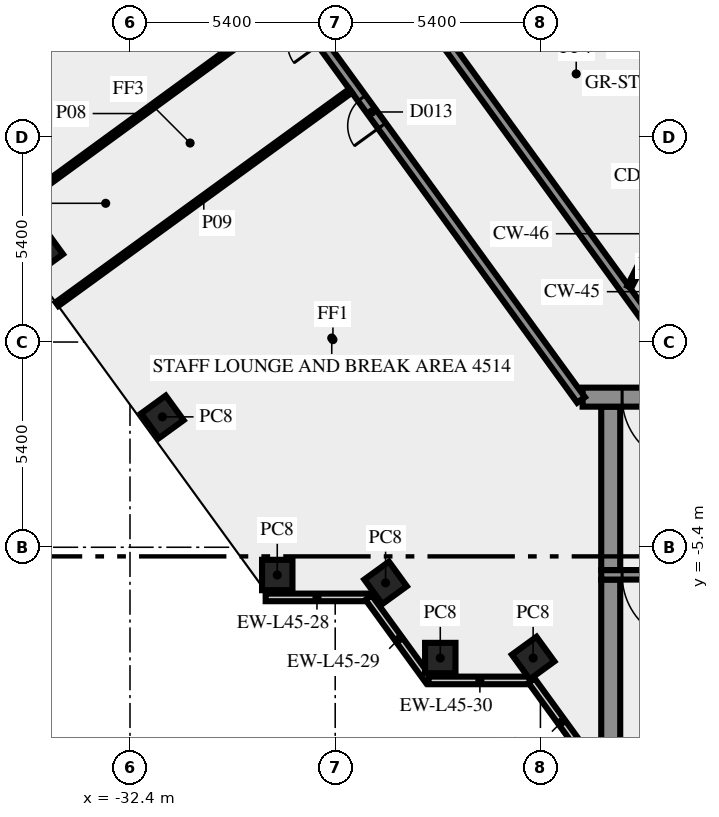
"""IFC4 building model, lengths in metres.
Left out: names, types, materials, properties, quantities, classifications, styles, units other than length and angle.
Written with IfcOpenShell. Run it as: python <this file> out.ifc"""

import sys

from ifc_helpers import new_model, si_unit, direction, frame, frame_2d, origin, origin_2d, place, context, subcontext, project, spatial, rectangle, extrude, element, fill, save


model = new_model("IFC4")
c1 = context("Model", 3, precision=1e-05, world=origin(), true_north=direction((0.0, 1.0)))
c2 = subcontext(c1, "Body", "Model", "MODEL_VIEW")
j1 = project(units=[si_unit("LENGTHUNIT", "METRE"), si_unit("PLANEANGLEUNIT", "RADIAN")], contexts=[c1])
p1 = place(None, origin())
s1 = spatial("IfcSite", under=j1, at=p1, CompositionType="ELEMENT")
p2 = place(p1, origin())
s2 = spatial("IfcBuilding", under=s1, at=p2, CompositionType="ELEMENT")
p3 = place(p2, frame((0.0, 0.0, 194.0)))
s3 = spatial("IfcBuildingStorey", under=s2, at=p3, CompositionType="ELEMENT", Elevation=194.0)
for number, where, z_axis, x_axis in (
    (1, (-34.722, 2.4, 0.0), (0.0, 0.0, 1.0), (0.588, -0.809, 0.0)),
    (2, (-31.548, -1.969, 0.0), (0.0, 0.0, 1.0), (0.588, -0.809, 0.0)),
    (3, (-28.525, -6.13, 0.0), (0.0, 0.0, 1.0), (1.0, 0.0, 0.0)),
    (4, (-25.674, -6.337, 0.0), (0.0, 0.0, 1.0), (0.588, -0.809, 0.0)),
    (5, (-24.235, -8.315, 0.0), (0.0, 0.0, 1.0), (1.0, 0.0, 0.0)),
    (6, (-21.792, -8.315, 0.0), (0.0, 0.0, 1.0), (0.588, -0.809, 0.0)),
):
    element("IfcColumn", number, at=place(p3, frame(where, z_axis=z_axis, x_axis=x_axis)), inside=s3, PredefinedType="COLUMN", context=c2, shape_type="SweptSolid", body=[
        extrude(rectangle(XDim=0.8, YDim=0.8, at=origin_2d()), origin(), (0.0, 0.0, 1.0), 3.65),
    ])
p4 = place(p3, frame((-28.83, -6.719, 0.0), z_axis=(0.0, 0.0, 1.0), x_axis=(1.0, 0.0, 0.0)))
e7 = element("IfcWall", 7, at=p4, inside=s3, PredefinedType="SOLIDWALL", context=c2, shape_type="SweptSolid", body=[
    extrude(rectangle(XDim=2.7, YDim=0.2, at=frame_2d((1.35, 0.0))), origin(), (0.0, 0.0, 1.0), 3.65),
])
p5 = place(p3, frame((-26.12, -6.724, 0.0), z_axis=(0.0, 0.0, 1.0), x_axis=(0.587720002413, -0.809064397168, 0.0)))
e8 = element("IfcWall", 8, at=p5, inside=s3, PredefinedType="SOLIDWALL", context=c2, shape_type="SweptSolid", body=[
    extrude(rectangle(XDim=2.7, YDim=0.2, at=frame_2d((1.35, 0.0))), origin(), (0.0, 0.0, 1.0), 3.65),
])
p6 = place(p3, frame((-24.543, -8.904, 0.0), z_axis=(0.0, 0.0, 1.0), x_axis=(1.0, 0.0, 0.0)))
e9 = element("IfcWall", 9, at=p6, inside=s3, PredefinedType="SOLIDWALL", context=c2, shape_type="SweptSolid", body=[
    extrude(rectangle(XDim=2.7, YDim=0.2, at=frame_2d((1.35, 0.0))), origin(), (0.0, 0.0, 1.0), 3.65),
])
p7 = place(p3, frame((-21.833, -8.909, 0.0), z_axis=(0.0, 0.0, 1.0), x_axis=(0.587766567315, -0.809030569476, 0.0)))
e10 = element("IfcWall", 10, at=p7, inside=s3, PredefinedType="SOLIDWALL", context=c2, shape_type="SweptSolid", body=[
    extrude(rectangle(XDim=2.688, YDim=0.2, at=frame_2d((1.344, 0.0))), origin(), (0.0, 0.0, 1.0), 3.65),
])
p8 = place(p3, frame((-19.75, -10.5, 0.0), z_axis=(0.0, 0.0, 1.0), x_axis=(0.0, 1.0, 0.0)))
e11 = element("IfcWall", 11, at=p8, inside=s3, PredefinedType="SHEAR", context=c2, shape_type="SweptSolid", body=[
    extrude(rectangle(XDim=4.25, YDim=0.5, at=frame_2d((2.125, 0.0))), origin(), (0.0, 0.0, 1.0), 3.65),
])
p9 = place(p3, frame((-9.2, -6.125, 0.0), z_axis=(0.0, 0.0, 1.0), x_axis=(-1.0, 0.0, 0.0)))
e12 = element("IfcWall", 12, at=p9, inside=s3, PredefinedType="SHEAR", context=c2, shape_type="SweptSolid", body=[
    extrude(rectangle(XDim=10.8, YDim=0.25, at=frame_2d((5.4, 0.0))), origin(), (0.0, 0.0, 1.0), 3.65),
])
p10 = place(p9, frame((8.45, 0.0, 0.0)))
e13 = element("IfcOpeningElement", 13, at=p10, cuts=e12, PredefinedType="OPENING", context=c2, shape_type="SweptSolid", body=[
    extrude(rectangle(XDim=1.8, YDim=2.1, at=frame_2d((0.9, 1.05))), frame((0.0, 0.135, 0.0), z_axis=(0.0, -1.0, 0.0), x_axis=(1.0, 0.0, 0.0)), (0.0, 0.0, 1.0), 0.27),
])
p11 = place(p3, frame((-19.75, -6.0, 0.0), z_axis=(0.0, 0.0, 1.0), x_axis=(0.0, 1.0, 0.0)))
e14 = element("IfcWall", 14, at=p11, inside=s3, PredefinedType="SHEAR", context=c2, shape_type="SweptSolid", body=[
    extrude(rectangle(XDim=4.3, YDim=0.5, at=frame_2d((2.15, 0.0))), origin(), (0.0, 0.0, 1.0), 3.65),
])
p12 = place(p3, frame((20.49, -1.45, 0.0), z_axis=(0.0, 0.0, 1.0), x_axis=(-1.0, 0.0, 0.0)))
e15 = element("IfcWall", 15, at=p12, inside=s3, PredefinedType="SHEAR", context=c2, shape_type="SweptSolid", body=[
    extrude(rectangle(XDim=40.98, YDim=0.5, at=frame_2d((20.49, 0.0))), origin(), (0.0, 0.0, 1.0), 3.65),
])
p13 = place(p12, frame((38.14, 0.0, 0.0)))
e16 = element("IfcOpeningElement", 16, at=p13, cuts=e15, PredefinedType="OPENING", context=c2, shape_type="SweptSolid", body=[
    extrude(rectangle(XDim=1.8, YDim=2.1, at=frame_2d((0.9, 1.05))), frame((0.0, 0.26, 0.0), z_axis=(0.0, -1.0, 0.0), x_axis=(1.0, 0.0, 0.0)), (0.0, 0.0, 1.0), 0.52),
])
p14 = place(p12, frame((35.89, 0.0, 0.0)))
e17 = element("IfcOpeningElement", 17, at=p14, cuts=e15, PredefinedType="OPENING", context=c2, shape_type="SweptSolid", body=[
    extrude(rectangle(XDim=0.9, YDim=2.1, at=frame_2d((0.45, 1.05))), frame((0.0, 0.26, 0.0), z_axis=(0.0, -1.0, 0.0), x_axis=(1.0, 0.0, 0.0)), (0.0, 0.0, 1.0), 0.52),
])
p15 = place(p12, frame((32.94, 0.0, 0.0)))
e18 = element("IfcOpeningElement", 18, at=p15, cuts=e15, PredefinedType="OPENING", context=c2, shape_type="SweptSolid", body=[
    extrude(rectangle(XDim=0.9, YDim=2.1, at=frame_2d((0.45, 1.05))), frame((0.0, 0.26, 0.0), z_axis=(0.0, -1.0, 0.0), x_axis=(1.0, 0.0, 0.0)), (0.0, 0.0, 1.0), 0.52),
])
p16 = place(p12, frame((30.302, 0.0, 0.0)))
e19 = element("IfcOpeningElement", 19, at=p16, cuts=e15, PredefinedType="OPENING", context=c2, shape_type="SweptSolid", body=[
    extrude(rectangle(XDim=0.9, YDim=2.1, at=frame_2d((0.45, 1.05))), frame((0.0, 0.26, 0.0), z_axis=(0.0, -1.0, 0.0), x_axis=(1.0, 0.0, 0.0)), (0.0, 0.0, 1.0), 0.52),
])
p17 = place(p12, frame((26.577, 0.0, 0.0)))
e20 = element("IfcOpeningElement", 20, at=p17, cuts=e15, PredefinedType="OPENING", context=c2, shape_type="SweptSolid", body=[
    extrude(rectangle(XDim=0.9, YDim=2.1, at=frame_2d((0.45, 1.05))), frame((0.0, 0.26, 0.0), z_axis=(0.0, -1.0, 0.0), x_axis=(1.0, 0.0, 0.0)), (0.0, 0.0, 1.0), 0.52),
])
p18 = place(p12, frame((19.59, 0.0, 0.0)))
e21 = element("IfcOpeningElement", 21, at=p18, cuts=e15, PredefinedType="OPENING", context=c2, shape_type="SweptSolid", body=[
    extrude(rectangle(XDim=2.0, YDim=2.1, at=frame_2d((1.0, 1.05))), frame((0.0, 0.26, 0.0), z_axis=(0.0, -1.0, 0.0), x_axis=(1.0, 0.0, 0.0)), (0.0, 0.0, 1.0), 0.52),
])
p19 = place(p12, frame((7.14, 0.0, 0.0)))
e22 = element("IfcOpeningElement", 22, at=p19, cuts=e15, PredefinedType="OPENING", context=c2, shape_type="SweptSolid", body=[
    extrude(rectangle(XDim=0.9, YDim=2.1, at=frame_2d((0.45, 1.05))), frame((0.0, 0.26, 0.0), z_axis=(0.0, -1.0, 0.0), x_axis=(1.0, 0.0, 0.0)), (0.0, 0.0, 1.0), 0.52),
])
p20 = place(p12, frame((5.028, 0.0, 0.0)))
e23 = element("IfcOpeningElement", 23, at=p20, cuts=e15, PredefinedType="OPENING", context=c2, shape_type="SweptSolid", body=[
    extrude(rectangle(XDim=0.8, YDim=2.1, at=frame_2d((0.4, 1.05))), frame((0.0, 0.26, 0.0), z_axis=(0.0, -1.0, 0.0), x_axis=(1.0, 0.0, 0.0)), (0.0, 0.0, 1.0), 0.52),
])
p21 = place(p12, frame((3.452, 0.0, 0.0)))
e24 = element("IfcOpeningElement", 24, at=p21, cuts=e15, PredefinedType="OPENING", context=c2, shape_type="SweptSolid", body=[
    extrude(rectangle(XDim=0.8, YDim=2.1, at=frame_2d((0.4, 1.05))), frame((0.0, 0.26, 0.0), z_axis=(0.0, -1.0, 0.0), x_axis=(1.0, 0.0, 0.0)), (0.0, 0.0, 1.0), 0.52),
])
p22 = place(p12, frame((1.04, 0.0, 0.0)))
e25 = element("IfcOpeningElement", 25, at=p22, cuts=e15, PredefinedType="OPENING", context=c2, shape_type="SweptSolid", body=[
    extrude(rectangle(XDim=1.8, YDim=2.1, at=frame_2d((0.9, 1.05))), frame((0.0, 0.26, 0.0), z_axis=(0.0, -1.0, 0.0), x_axis=(1.0, 0.0, 0.0)), (0.0, 0.0, 1.0), 0.52),
])
p23 = place(p3, frame((-20.531, -1.523, 0.0), z_axis=(0.0, 0.0, 1.0), x_axis=(-0.587785812891, 0.809016587076, 0.0)))
e26 = element("IfcWall", 26, at=p23, inside=s3, PredefinedType="SOLIDWALL", context=c2, shape_type="SweptSolid", body=[
    extrude(rectangle(XDim=28.67, YDim=0.25, at=frame_2d((14.335, 0.0))), origin(), (0.0, 0.0, 1.0), 3.65),
])
p24 = place(p23, frame((17.015, 0.0, 0.0)))
e27 = element("IfcOpeningElement", 27, at=p24, cuts=e26, PredefinedType="OPENING", context=c2, shape_type="SweptSolid", body=[
    extrude(rectangle(XDim=0.9, YDim=2.1, at=frame_2d((0.45, 1.05))), frame((0.0, 0.135, 0.0), z_axis=(0.0, -1.0, 0.0), x_axis=(1.0, 0.0, 0.0)), (0.0, 0.0, 1.0), 0.27),
])
p25 = place(p23, frame((8.916, 0.0, 0.0)))
e28 = element("IfcOpeningElement", 28, at=p25, cuts=e26, PredefinedType="OPENING", context=c2, shape_type="SweptSolid", body=[
    extrude(rectangle(XDim=0.9, YDim=2.1, at=frame_2d((0.45, 1.05))), frame((0.0, 0.135, 0.0), z_axis=(0.0, -1.0, 0.0), x_axis=(1.0, 0.0, 0.0)), (0.0, 0.0, 1.0), 0.27),
])
p26 = place(p23, frame((18.616, 0.0, 0.0)))
e29 = element("IfcOpeningElement", 29, at=p26, cuts=e26, PredefinedType="OPENING", context=c2, shape_type="SweptSolid", body=[
    extrude(rectangle(XDim=0.9, YDim=2.1, at=frame_2d((0.45, 1.05))), frame((0.0, 0.135, 0.0), z_axis=(0.0, -1.0, 0.0), x_axis=(1.0, 0.0, 0.0)), (0.0, 0.0, 1.0), 0.27),
])
p27 = place(p23, frame((11.615, 0.0, 0.0)))
e30 = element("IfcOpeningElement", 30, at=p27, cuts=e26, PredefinedType="OPENING", context=c2, shape_type="SweptSolid", body=[
    extrude(rectangle(XDim=0.9, YDim=2.1, at=frame_2d((0.45, 1.05))), frame((0.0, 0.135, 0.0), z_axis=(0.0, -1.0, 0.0), x_axis=(1.0, 0.0, 0.0)), (0.0, 0.0, 1.0), 0.27),
])
p28 = place(p3, frame((-35.092, 23.027, 0.0), z_axis=(0.0, 0.0, 1.0), x_axis=(0.587784076945, -0.809017848313, 0.0)))
e31 = element("IfcWall", 31, at=p28, inside=s3, PredefinedType="SOLIDWALL", context=c2, shape_type="SweptSolid", body=[
    extrude(rectangle(XDim=29.853, YDim=0.25, at=frame_2d((14.927, 0.0))), origin(), (0.0, 0.0, 1.0), 3.65),
])
p29 = place(p28, frame((10.095, 0.0, 0.0)))
e32 = element("IfcOpeningElement", 32, at=p29, cuts=e31, PredefinedType="OPENING", context=c2, shape_type="SweptSolid", body=[
    extrude(rectangle(XDim=0.9, YDim=2.1, at=frame_2d((0.45, 1.05))), frame((0.0, 0.135, 0.0), z_axis=(0.0, -1.0, 0.0), x_axis=(1.0, 0.0, 0.0)), (0.0, 0.0, 1.0), 0.27),
])
p30 = place(p28, frame((15.495, 0.0, 0.0)))
e33 = element("IfcOpeningElement", 33, at=p30, cuts=e31, PredefinedType="OPENING", context=c2, shape_type="SweptSolid", body=[
    extrude(rectangle(XDim=0.9, YDim=2.1, at=frame_2d((0.45, 1.05))), frame((0.0, 0.135, 0.0), z_axis=(0.0, -1.0, 0.0), x_axis=(1.0, 0.0, 0.0)), (0.0, 0.0, 1.0), 0.27),
])
p31 = place(p28, frame((0.224, 0.0, 0.0)))
e34 = element("IfcOpeningElement", 34, at=p31, cuts=e31, PredefinedType="OPENING", context=c2, shape_type="SweptSolid", body=[
    extrude(rectangle(XDim=0.9, YDim=2.1, at=frame_2d((0.45, 1.05))), frame((0.0, 0.135, 0.0), z_axis=(0.0, -1.0, 0.0), x_axis=(1.0, 0.0, 0.0)), (0.0, 0.0, 1.0), 0.27),
])
p32 = place(p3, frame((-31.356, 13.164, 0.0), z_axis=(0.0, 0.0, 1.0), x_axis=(-0.809102944047, -0.587666934526, 0.0)))
e35 = element("IfcWall", 35, at=p32, inside=s3, PredefinedType="PARTITIONING", context=c2, shape_type="SweptSolid", body=[
    extrude(rectangle(XDim=9.55, YDim=0.12, at=frame_2d((4.775, 0.0))), origin(), (0.0, 0.0, 1.0), 2.85),
])
p33 = place(p3, frame((-35.919, 3.197, 0.0), z_axis=(0.0, 0.0, 1.0), x_axis=(0.807645841498, 0.589667868135, 0.0)))
e36 = element("IfcWall", 36, at=p33, inside=s3, PredefinedType="PARTITIONING", context=c2, shape_type="SweptSolid", body=[
    extrude(rectangle(XDim=9.551, YDim=0.12, at=frame_2d((4.775, 0.0))), origin(), (0.0, 0.0, 1.0), 2.85),
])
p34 = place(p3, frame((-26.595, 6.611, 0.0), z_axis=(0.0, 0.0, 1.0), x_axis=(-0.80900684162, -0.587799226107, 0.0)))
e37 = element("IfcWall", 37, at=p34, inside=s3, PredefinedType="PARTITIONING", context=c2, shape_type="SweptSolid", body=[
    extrude(rectangle(XDim=9.55, YDim=0.12, at=frame_2d((4.775, 0.0))), origin(), (0.0, 0.0, 1.0), 2.85),
])
p35 = place(p3, frame((-19.261, 1.45, 0.0), z_axis=(0.0, 0.0, 1.0), x_axis=(0.453950796792, 0.891026752736, 0.0)))
e38 = element("IfcWall", 38, at=p35, inside=s3, PredefinedType="PARTITIONING", context=c2, shape_type="SweptSolid", body=[
    extrude(rectangle(XDim=2.778, YDim=0.12, at=frame_2d((1.389, 0.0))), origin(), (0.0, 0.0, 1.0), 3.65),
])
p36 = place(p10, origin())
e39 = element("IfcDoor", 39, at=p36, inside=s3, OperationType="DOUBLE_DOOR_SINGLE_SWING", PredefinedType="DOOR", context=c2, shape_type="SweptSolid", body=[
    extrude(rectangle(XDim=1.8, YDim=2.1, at=frame_2d((0.9, 1.05))), frame((0.0, 0.025, 0.0), z_axis=(0.0, -1.0, 0.0), x_axis=(1.0, 0.0, 0.0)), (0.0, 0.0, 1.0), 0.05),
])
fill(e13, e39)
p37 = place(p13, origin())
e40 = element("IfcDoor", 40, at=p37, inside=s3, OperationType="DOUBLE_DOOR_SINGLE_SWING", PredefinedType="DOOR", context=c2, shape_type="SweptSolid", body=[
    extrude(rectangle(XDim=1.8, YDim=2.1, at=frame_2d((0.9, 1.05))), frame((0.0, 0.025, 0.0), z_axis=(0.0, -1.0, 0.0), x_axis=(1.0, 0.0, 0.0)), (0.0, 0.0, 1.0), 0.05),
])
fill(e16, e40)
p38 = place(p25, origin())
e41 = element("IfcDoor", 41, at=p38, inside=s3, OperationType="SINGLE_SWING_RIGHT", PredefinedType="DOOR", context=c2, shape_type="SweptSolid", body=[
    extrude(rectangle(XDim=0.9, YDim=2.1, at=frame_2d((0.45, 1.05))), frame((0.0, 0.025, 0.0), z_axis=(0.0, -1.0, 0.0), x_axis=(1.0, 0.0, 0.0)), (0.0, 0.0, 1.0), 0.05),
])
fill(e28, e41)
save(model, sys.argv[1])
